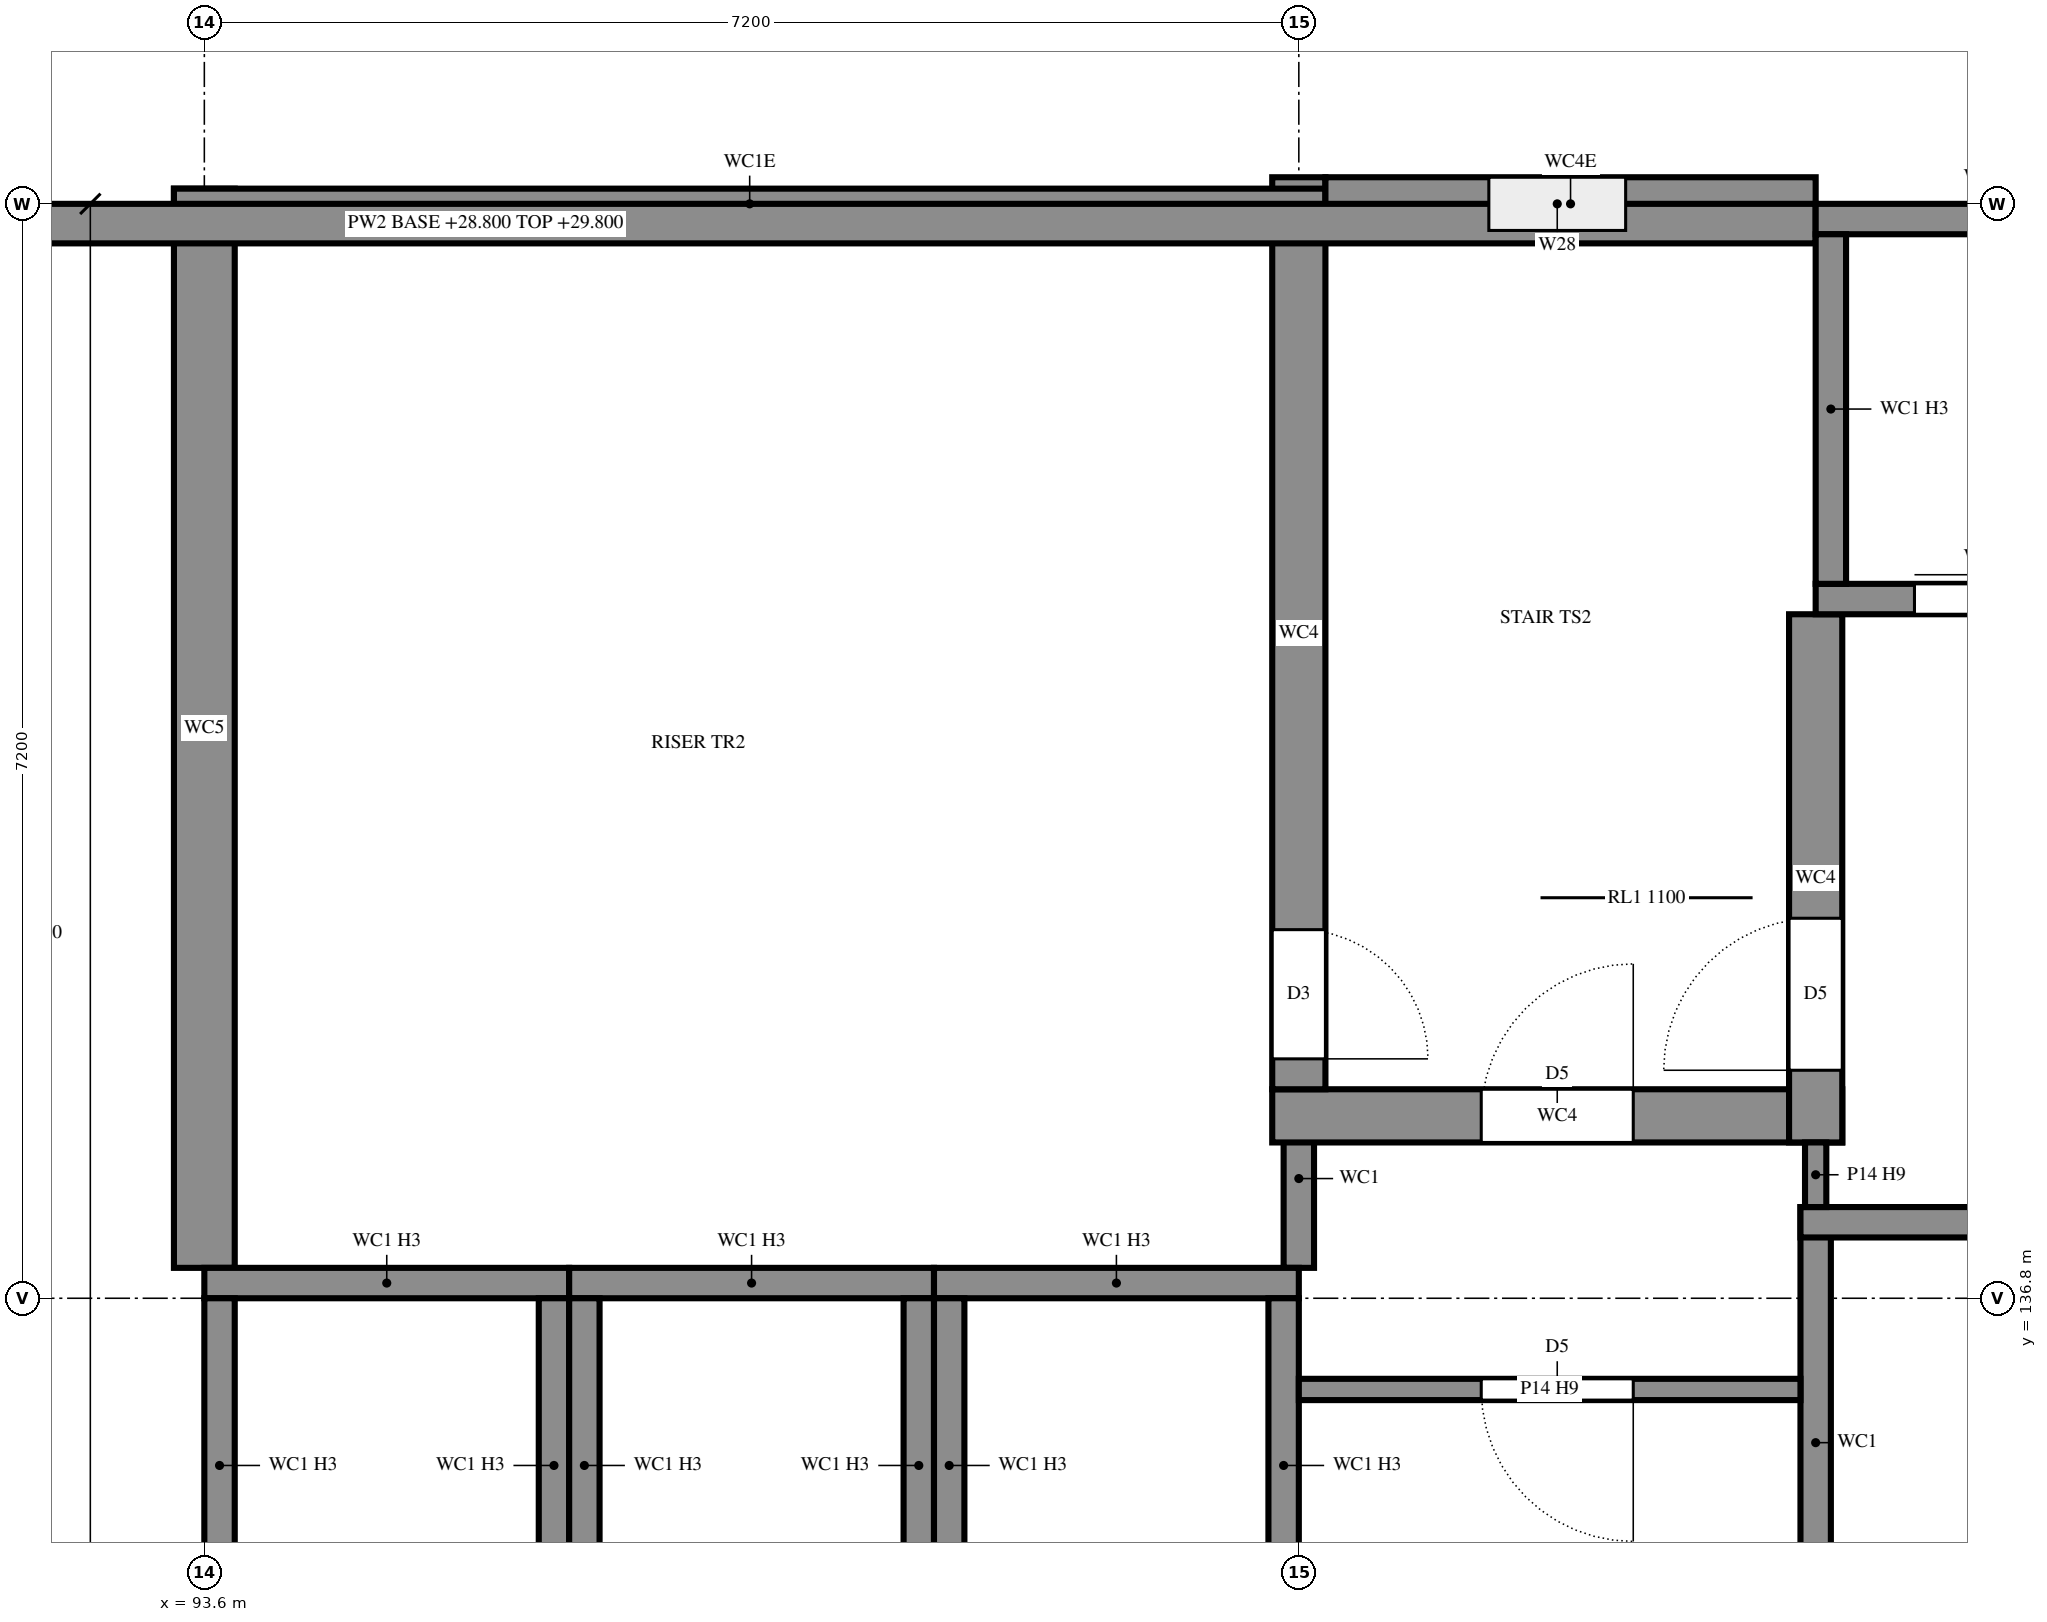
"""IFC4 building model, lengths in metres.
Left out: names, types, materials, properties, quantities, classifications, styles, units other than length and angle.
Written with IfcOpenShell. Run it as: python <this file> out.ifc"""

import sys

from ifc_helpers import new_model, si_unit, direction, frame, frame_2d, origin, place, context, subcontext, project, spatial, rectangle, extrude, element, fill, save


model = new_model("IFC4")
c1 = context("Model", 3, precision=1e-05, world=origin(), true_north=direction((0.0, 1.0)))
c2 = subcontext(c1, "Body", "Model", "MODEL_VIEW")
j1 = project(units=[si_unit("LENGTHUNIT", "METRE"), si_unit("PLANEANGLEUNIT", "RADIAN")], contexts=[c1])
p1 = place(None, origin())
s1 = spatial("IfcSite", under=j1, at=p1, CompositionType="ELEMENT")
p2 = place(p1, origin())
s2 = spatial("IfcBuilding", under=s1, at=p2, CompositionType="ELEMENT")
p3 = place(p2, frame((0.0, 0.0, 25.2)))
s3 = spatial("IfcBuildingStorey", under=s2, at=p3, CompositionType="ELEMENT", Elevation=25.2)
p4 = place(p3, frame((100.8, 137.0, 0.0), z_axis=(0.0, 0.0, 1.0), x_axis=(0.0, 1.0, 0.0)))
e1 = element("IfcWall", 1, at=p4, inside=s3, PredefinedType="SHEAR", context=c2, shape_type="SweptSolid", body=[
    extrude(rectangle(XDim=1.175, YDim=0.2, at=frame_2d((0.587, 0.0))), origin(), (0.0, 0.0, 1.0), 3.6),
])
p5 = place(p3, frame((104.2, 137.4, 0.0), z_axis=(0.0, 0.0, 1.0), x_axis=(0.0, -1.0, 0.0)))
e2 = element("IfcWall", 2, at=p5, inside=s3, PredefinedType="SHEAR", context=c2, shape_type="SweptSolid", body=[
    extrude(rectangle(XDim=3.1, YDim=0.2, at=frame_2d((1.55, 0.0))), origin(), (0.0, 0.0, 1.0), 3.6),
])
p6 = place(p3, frame((108.2, 137.3, 0.0), z_axis=(0.0, 0.0, 1.0), x_axis=(-1.0, 0.0, 0.0)))
e3 = element("IfcWall", 3, at=p6, inside=s3, PredefinedType="SHEAR", context=c2, shape_type="SweptSolid", body=[
    extrude(rectangle(XDim=4.1, YDim=0.2, at=frame_2d((2.05, 0.0))), origin(), (0.0, 0.0, 1.0), 3.6),
])
p7 = place(p3, frame((100.625, 138.0, 0.0), z_axis=(0.0, 0.0, 1.0), x_axis=(1.0, 0.0, 0.0)))
e4 = element("IfcWall", 4, at=p7, inside=s3, PredefinedType="SHEAR", context=c2, shape_type="SweptSolid", body=[
    extrude(rectangle(XDim=3.75, YDim=0.35, at=frame_2d((1.875, 0.0))), origin(), (0.0, 0.0, 1.0), 3.6),
])
p8 = place(p7, frame((1.375, 0.0, 0.0)))
e5 = element("IfcOpeningElement", 5, at=p8, cuts=e4, PredefinedType="OPENING", context=c2, shape_type="SweptSolid", body=[
    extrude(rectangle(XDim=1.0, YDim=2.1, at=frame_2d((0.5, 1.05))), frame((0.0, 0.185, 0.0), z_axis=(0.0, -1.0, 0.0), x_axis=(1.0, 0.0, 0.0)), (0.0, 0.0, 1.0), 0.37),
])
p9 = place(p3, frame((104.2, 137.825, 0.0), z_axis=(0.0, 0.0, 1.0), x_axis=(0.0, 1.0, 0.0)))
e6 = element("IfcWall", 6, at=p9, inside=s3, PredefinedType="SHEAR", context=c2, shape_type="SweptSolid", body=[
    extrude(rectangle(XDim=3.475, YDim=0.35, at=frame_2d((1.738, 0.0))), origin(), (0.0, 0.0, 1.0), 3.6),
])
p10 = place(p9, frame((0.475, 0.0, 0.0)))
e7 = element("IfcOpeningElement", 7, at=p10, cuts=e6, PredefinedType="OPENING", context=c2, shape_type="SweptSolid", body=[
    extrude(rectangle(XDim=1.0, YDim=2.1, at=frame_2d((0.5, 1.05))), frame((0.0, 0.185, 0.0), z_axis=(0.0, -1.0, 0.0), x_axis=(1.0, 0.0, 0.0)), (0.0, 0.0, 1.0), 0.37),
])
p11 = place(p3, frame((93.6, 144.1, 0.0), z_axis=(0.0, 0.0, 1.0), x_axis=(0.0, -1.0, 0.0)))
e8 = element("IfcWall", 8, at=p11, inside=s3, PredefinedType="SHEAR", context=c2, shape_type="SweptSolid", body=[
    extrude(rectangle(XDim=7.1, YDim=0.4, at=frame_2d((3.55, 0.0))), origin(), (0.0, 0.0, 1.0), 3.6),
])
p12 = place(p3, frame((100.8, 144.175, 0.0), z_axis=(0.0, 0.0, 1.0), x_axis=(0.0, -1.0, 0.0)))
e9 = element("IfcWall", 9, at=p12, inside=s3, PredefinedType="SHEAR", context=c2, shape_type="SweptSolid", body=[
    extrude(rectangle(XDim=6.0, YDim=0.35, at=frame_2d((3.0, 0.0))), origin(), (0.0, 0.0, 1.0), 3.6),
])
p13 = place(p12, frame((4.95, 0.0, 0.0)))
e10 = element("IfcOpeningElement", 10, at=p13, cuts=e9, PredefinedType="OPENING", context=c2, shape_type="SweptSolid", body=[
    extrude(rectangle(XDim=0.85, YDim=2.1, at=frame_2d((0.425, 1.05))), frame((0.0, 0.185, 0.0), z_axis=(0.0, -1.0, 0.0), x_axis=(1.0, 0.0, 0.0)), (0.0, 0.0, 1.0), 0.37),
])
p14 = place(p3, frame((100.975, 144.0, 0.0), z_axis=(0.0, 0.0, 1.0), x_axis=(-1.0, 0.0, 0.0)))
e11 = element("IfcWall", 11, at=p14, inside=s3, PredefinedType="SHEAR", context=c2, shape_type="SweptSolid", body=[
    extrude(rectangle(XDim=7.575, YDim=0.2, at=frame_2d((3.788, 0.0))), origin(), (0.0, 0.0, 1.0), 3.6),
])
p15 = place(p3, frame((104.2, 144.0, 0.0), z_axis=(0.0, 0.0, 1.0), x_axis=(-1.0, 0.0, 0.0)))
e12 = element("IfcWall", 12, at=p15, inside=s3, PredefinedType="SHEAR", context=c2, shape_type="SweptSolid", body=[
    extrude(rectangle(XDim=3.225, YDim=0.35, at=frame_2d((1.612, 0.0))), origin(), (0.0, 0.0, 1.0), 3.6),
])
p16 = place(p15, frame((1.25, 0.0, 0.6)))
e13 = element("IfcOpeningElement", 13, at=p16, cuts=e12, PredefinedType="OPENING", context=c2, shape_type="SweptSolid", body=[
    extrude(rectangle(XDim=0.9, YDim=2.1, at=frame_2d((0.45, 1.05))), frame((0.0, 0.185, 0.0), z_axis=(0.0, -1.0, 0.0), x_axis=(1.0, 0.0, 0.0)), (0.0, 0.0, 1.0), 0.37),
])
p17 = place(p3, frame((86.7, 143.87, 3.6), z_axis=(0.0, 0.0, 1.0), x_axis=(1.0, 0.0, 0.0)))
e14 = element("IfcWall", 14, at=p17, inside=s3, PredefinedType="PARAPET", context=c2, shape_type="SweptSolid", body=[
    extrude(rectangle(XDim=17.5, YDim=0.26, at=frame_2d((8.75, 0.0))), origin(), (0.0, 0.0, 1.0), 1.0),
])
p18 = place(p3, frame((93.6, 136.9, 0.0), z_axis=(0.0, 0.0, 1.0), x_axis=(1.0, 0.0, 0.0)))
e15 = element("IfcWall", 15, at=p18, inside=s3, PredefinedType="SHEAR", context=c2, shape_type="SweptSolid", body=[
    extrude(rectangle(XDim=2.4, YDim=0.2, at=frame_2d((1.2, 0.0))), origin(), (0.0, 0.0, 1.0), 4.5),
])
for number, where, z_axis, x_axis in (
    (16, (93.7, 134.6, 0.0), (0.0, 0.0, 1.0), (0.0, 1.0, 0.0)),
    (17, (95.9, 134.6, 0.0), (0.0, 0.0, 1.0), (0.0, 1.0, 0.0)),
):
    element("IfcWall", number, at=place(p3, frame(where, z_axis=z_axis, x_axis=x_axis)), inside=s3, PredefinedType="SHEAR", context=c2, shape_type="SweptSolid", body=[
        extrude(rectangle(XDim=2.2, YDim=0.2, at=frame_2d((1.1, 0.0))), origin(), (0.0, 0.0, 1.0), 4.5),
    ])
p19 = place(p3, frame((96.0, 136.9, 0.0), z_axis=(0.0, 0.0, 1.0), x_axis=(1.0, 0.0, 0.0)))
e18 = element("IfcWall", 18, at=p19, inside=s3, PredefinedType="SHEAR", context=c2, shape_type="SweptSolid", body=[
    extrude(rectangle(XDim=2.4, YDim=0.2, at=frame_2d((1.2, 0.0))), origin(), (0.0, 0.0, 1.0), 4.5),
])
for number, where, z_axis, x_axis in (
    (19, (96.1, 134.6, 0.0), (0.0, 0.0, 1.0), (0.0, 1.0, 0.0)),
    (20, (98.3, 134.6, 0.0), (0.0, 0.0, 1.0), (0.0, 1.0, 0.0)),
):
    element("IfcWall", number, at=place(p3, frame(where, z_axis=z_axis, x_axis=x_axis)), inside=s3, PredefinedType="SHEAR", context=c2, shape_type="SweptSolid", body=[
        extrude(rectangle(XDim=2.2, YDim=0.2, at=frame_2d((1.1, 0.0))), origin(), (0.0, 0.0, 1.0), 4.5),
    ])
p20 = place(p3, frame((98.4, 136.9, 0.0), z_axis=(0.0, 0.0, 1.0), x_axis=(1.0, 0.0, 0.0)))
e21 = element("IfcWall", 21, at=p20, inside=s3, PredefinedType="SHEAR", context=c2, shape_type="SweptSolid", body=[
    extrude(rectangle(XDim=2.4, YDim=0.2, at=frame_2d((1.2, 0.0))), origin(), (0.0, 0.0, 1.0), 4.5),
])
for number, where, z_axis, x_axis in (
    (22, (98.5, 134.6, 0.0), (0.0, 0.0, 1.0), (0.0, 1.0, 0.0)),
    (23, (100.7, 134.6, 0.0), (0.0, 0.0, 1.0), (0.0, 1.0, 0.0)),
):
    element("IfcWall", number, at=place(p3, frame(where, z_axis=z_axis, x_axis=x_axis)), inside=s3, PredefinedType="SHEAR", context=c2, shape_type="SweptSolid", body=[
        extrude(rectangle(XDim=2.2, YDim=0.2, at=frame_2d((1.1, 0.0))), origin(), (0.0, 0.0, 1.0), 4.5),
    ])
p21 = place(p3, frame((104.2, 141.4, 0.0), z_axis=(0.0, 0.0, 1.0), x_axis=(1.0, 0.0, 0.0)))
e24 = element("IfcWall", 24, at=p21, inside=s3, PredefinedType="SHEAR", context=c2, shape_type="SweptSolid", body=[
    extrude(rectangle(XDim=2.4, YDim=0.2, at=frame_2d((1.2, 0.0))), origin(), (0.0, 0.0, 1.0), 4.5),
])
p22 = place(p21, frame((0.65, 0.0, 0.0)))
e25 = element("IfcOpeningElement", 25, at=p22, cuts=e24, PredefinedType="OPENING", context=c2, shape_type="SweptSolid", body=[
    extrude(rectangle(XDim=1.1, YDim=2.1, at=frame_2d((0.55, 1.05))), frame((0.0, 0.11, 0.0), z_axis=(0.0, -1.0, 0.0), x_axis=(1.0, 0.0, 0.0)), (0.0, 0.0, 1.0), 0.22),
])
p23 = place(p3, frame((104.2, 143.9, 0.0), z_axis=(0.0, 0.0, 1.0), x_axis=(1.0, 0.0, 0.0)))
e26 = element("IfcWall", 26, at=p23, inside=s3, PredefinedType="SHEAR", context=c2, shape_type="SweptSolid", body=[
    extrude(rectangle(XDim=2.4, YDim=0.2, at=frame_2d((1.2, 0.0))), origin(), (0.0, 0.0, 1.0), 4.5),
])
p24 = place(p3, frame((104.3, 141.5, 0.0), z_axis=(0.0, 0.0, 1.0), x_axis=(0.0, 1.0, 0.0)))
e27 = element("IfcWall", 27, at=p24, inside=s3, PredefinedType="SHEAR", context=c2, shape_type="SweptSolid", body=[
    extrude(rectangle(XDim=2.3, YDim=0.2, at=frame_2d((1.15, 0.0))), origin(), (0.0, 0.0, 1.0), 4.5),
])
p25 = place(p3, frame((100.8, 136.2, 0.0), z_axis=(0.0, 0.0, 1.0), x_axis=(1.0, 0.0, 0.0)))
e28 = element("IfcWall", 28, at=p25, inside=s3, PredefinedType="PARTITIONING", context=c2, shape_type="SweptSolid", body=[
    extrude(rectangle(XDim=3.3, YDim=0.14, at=frame_2d((1.65, 0.0))), origin(), (0.0, 0.0, 1.0), 3.29),
])
p26 = place(p25, frame((1.2, 0.0, 0.0)))
e29 = element("IfcOpeningElement", 29, at=p26, cuts=e28, PredefinedType="OPENING", context=c2, shape_type="SweptSolid", body=[
    extrude(rectangle(XDim=1.0, YDim=2.1, at=frame_2d((0.5, 1.05))), frame((0.0, 0.08, 0.0), z_axis=(0.0, -1.0, 0.0), x_axis=(1.0, 0.0, 0.0)), (0.0, 0.0, 1.0), 0.16),
])
p27 = place(p3, frame((104.2, 137.4, 0.0), z_axis=(0.0, 0.0, 1.0), x_axis=(0.0, 1.0, 0.0)))
e30 = element("IfcWall", 30, at=p27, inside=s3, PredefinedType="PARTITIONING", context=c2, shape_type="SweptSolid", body=[
    extrude(rectangle(XDim=0.425, YDim=0.14, at=frame_2d((0.212, 0.0))), origin(), (0.0, 0.0, 1.0), 3.29),
])
p28 = place(p16, origin())
e31 = element("IfcWindow", 31, at=p28, inside=s3, PartitioningType="SINGLE_PANEL", PredefinedType="WINDOW", context=c2, shape_type="SweptSolid", body=[
    extrude(rectangle(XDim=0.9, YDim=2.1, at=frame_2d((0.45, 1.05))), frame((0.0, 0.03, 0.0), z_axis=(0.0, -1.0, 0.0), x_axis=(1.0, 0.0, 0.0)), (0.0, 0.0, 1.0), 0.06),
])
fill(e13, e31)
p29 = place(p22, origin())
e32 = element("IfcDoor", 32, at=p29, inside=s3, OperationType="SLIDING_TO_LEFT", PredefinedType="DOOR", context=c2, shape_type="SweptSolid", body=[
    extrude(rectangle(XDim=1.1, YDim=2.1, at=frame_2d((0.55, 1.05))), frame((0.0, 0.025, 0.0), z_axis=(0.0, -1.0, 0.0), x_axis=(1.0, 0.0, 0.0)), (0.0, 0.0, 1.0), 0.05),
])
fill(e25, e32)
p30 = place(p26, frame((1.0, 0.0, 0.0), z_axis=(0.0, 0.0, 1.0), x_axis=(-1.0, 0.0, 0.0)))
e33 = element("IfcDoor", 33, at=p30, inside=s3, OperationType="SINGLE_SWING_RIGHT", PredefinedType="DOOR", context=c2, shape_type="SweptSolid", body=[
    extrude(rectangle(XDim=1.0, YDim=2.1, at=frame_2d((0.5, 1.05))), frame((0.0, 0.025, 0.0), z_axis=(0.0, -1.0, 0.0), x_axis=(1.0, 0.0, 0.0)), (0.0, 0.0, 1.0), 0.05),
])
fill(e29, e33)
p31 = place(p8, origin())
e34 = element("IfcDoor", 34, at=p31, inside=s3, OperationType="SINGLE_SWING_LEFT", PredefinedType="DOOR", context=c2, shape_type="SweptSolid", body=[
    extrude(rectangle(XDim=1.0, YDim=2.1, at=frame_2d((0.5, 1.05))), frame((0.0, 0.025, 0.0), z_axis=(0.0, -1.0, 0.0), x_axis=(1.0, 0.0, 0.0)), (0.0, 0.0, 1.0), 0.05),
])
fill(e5, e34)
p32 = place(p13, origin())
e35 = element("IfcDoor", 35, at=p32, inside=s3, OperationType="SINGLE_SWING_LEFT", PredefinedType="DOOR", context=c2, shape_type="SweptSolid", body=[
    extrude(rectangle(XDim=0.85, YDim=2.1, at=frame_2d((0.425, 1.05))), frame((0.0, 0.025, 0.0), z_axis=(0.0, -1.0, 0.0), x_axis=(1.0, 0.0, 0.0)), (0.0, 0.0, 1.0), 0.05),
])
fill(e10, e35)
p33 = place(p10, origin())
e36 = element("IfcDoor", 36, at=p33, inside=s3, OperationType="SINGLE_SWING_RIGHT", PredefinedType="DOOR", context=c2, shape_type="SweptSolid", body=[
    extrude(rectangle(XDim=1.0, YDim=2.1, at=frame_2d((0.5, 1.05))), frame((0.0, 0.025, 0.0), z_axis=(0.0, -1.0, 0.0), x_axis=(1.0, 0.0, 0.0)), (0.0, 0.0, 1.0), 0.05),
])
fill(e7, e36)
save(model, sys.argv[1])
